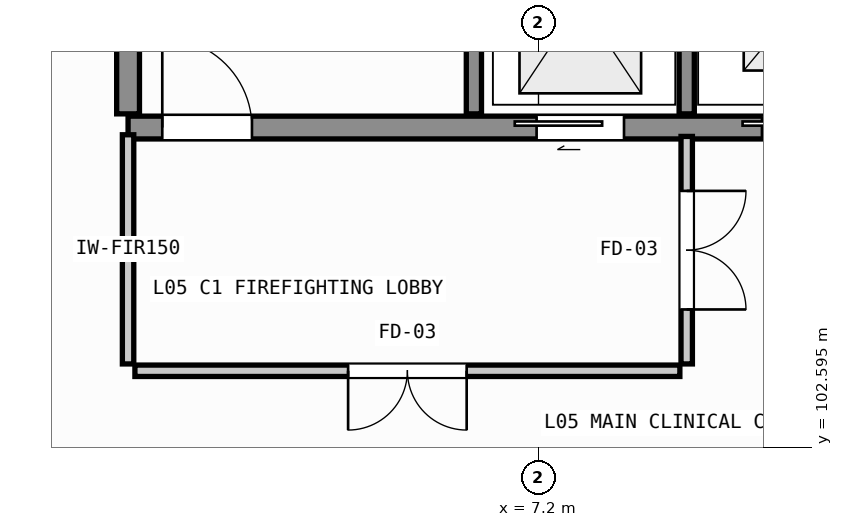
"""IFC4 building model, lengths in metres.
Left out: names, types, materials, properties, quantities, classifications, styles, units other than length and angle.
Written with IfcOpenShell. Run it as: python <this file> out.ifc"""

import sys

from ifc_helpers import new_model, si_unit, direction, frame, frame_2d, origin, place, context, subcontext, project, spatial, rectangle, extrude, element, fill, save


model = new_model("IFC4")
c1 = context("Model", 3, precision=1e-05, world=origin(), true_north=direction((0.0, 1.0)))
c2 = subcontext(c1, "Body", "Model", "MODEL_VIEW")
j1 = project(units=[si_unit("LENGTHUNIT", "METRE"), si_unit("PLANEANGLEUNIT", "RADIAN")], contexts=[c1])
p1 = place(None, origin())
s1 = spatial("IfcSite", under=j1, at=p1, CompositionType="ELEMENT")
p2 = place(p1, origin())
s2 = spatial("IfcBuilding", under=s1, at=p2, CompositionType="ELEMENT")
p3 = place(p2, frame((0.0, 0.0, 17.7)))
s3 = spatial("IfcBuildingStorey", under=s2, at=p3, CompositionType="ELEMENT", Elevation=17.7)
p4 = place(p3, frame((1.8, 106.8, 0.0), z_axis=(0.0, 0.0, 1.0), x_axis=(1.0, 0.0, 0.0)))
e1 = element("IfcWall", 1, at=p4, inside=s3, PredefinedType="SHEAR", context=c2, shape_type="SweptSolid", body=[
    extrude(rectangle(XDim=10.8, YDim=0.3, at=frame_2d((5.4, 0.0))), origin(), (0.0, 0.0, 1.0), 3.9),
])
p5 = place(p4, frame((0.45, 0.0, 0.0)))
e2 = element("IfcOpeningElement", 2, at=p5, cuts=e1, PredefinedType="OPENING", context=c2, shape_type="SweptSolid", body=[
    extrude(rectangle(XDim=1.18, YDim=2.16, at=frame_2d((0.59, 1.08))), frame((0.0, 0.16, 0.0), z_axis=(0.0, -1.0, 0.0), x_axis=(1.0, 0.0, 0.0)), (0.0, 0.0, 1.0), 0.32),
])
p6 = place(p4, frame((5.375, 0.0, 0.0)))
e3 = element("IfcOpeningElement", 3, at=p6, cuts=e1, PredefinedType="OPENING", context=c2, shape_type="SweptSolid", body=[
    extrude(rectangle(XDim=1.15, YDim=2.15, at=frame_2d((0.575, 1.075))), frame((0.0, 0.16, 0.0), z_axis=(0.0, -1.0, 0.0), x_axis=(1.0, 0.0, 0.0)), (0.0, 0.0, 1.0), 0.32),
])
p7 = place(p4, frame((8.34, 0.0, 0.0)))
e4 = element("IfcOpeningElement", 4, at=p7, cuts=e1, PredefinedType="OPENING", context=c2, shape_type="SweptSolid", body=[
    extrude(rectangle(XDim=1.02, YDim=2.12, at=frame_2d((0.51, 1.06))), frame((0.0, 0.16, 0.0), z_axis=(0.0, -1.0, 0.0), x_axis=(1.0, 0.0, 0.0)), (0.0, 0.0, 1.0), 0.32),
])
p8 = place(p3, frame((1.8, 106.98, 0.0), z_axis=(0.0, 0.0, 1.0), x_axis=(0.0, 1.0, 0.0)))
e5 = element("IfcWall", 5, at=p8, inside=s3, PredefinedType="SHEAR", context=c2, shape_type="SweptSolid", body=[
    extrude(rectangle(XDim=6.24, YDim=0.3, at=frame_2d((3.12, 0.0))), origin(), (0.0, 0.0, 1.0), 3.9),
])
for number, where, z_axis, x_axis in (
    (6, (6.35, 106.98, 0.0), (0.0, 0.0, 1.0), (0.0, 1.0, 0.0)),
    (7, (9.15, 106.98, 0.0), (0.0, 0.0, 1.0), (0.0, 1.0, 0.0)),
):
    element("IfcWall", number, at=place(p3, frame(where, z_axis=z_axis, x_axis=x_axis)), inside=s3, PredefinedType="SHEAR", context=c2, shape_type="SweptSolid", body=[
        extrude(rectangle(XDim=3.15, YDim=0.2, at=frame_2d((1.575, 0.0))), origin(), (0.0, 0.0, 1.0), 3.9),
    ])
p9 = place(p3, frame((1.8, 103.69, 0.0), z_axis=(0.0, 0.0, 1.0), x_axis=(0.0, 1.0, 0.0)))
e8 = element("IfcWall", 8, at=p9, inside=s3, PredefinedType="PARTITIONING", context=c2, shape_type="SweptSolid", body=[
    extrude(rectangle(XDim=3.015, YDim=0.15, at=frame_2d((1.508, 0.0))), origin(), (0.0, 0.0, 1.0), 3.67),
])
p10 = place(p3, frame((9.15, 106.683, 0.0), z_axis=(0.0, 0.0, 1.0), x_axis=(0.0, -1.0, 0.0)))
e9 = element("IfcWall", 9, at=p10, inside=s3, PredefinedType="PARTITIONING", context=c2, shape_type="SweptSolid", body=[
    extrude(rectangle(XDim=2.993, YDim=0.15, at=frame_2d((1.497, 0.0))), origin(), (0.0, 0.0, 1.0), 3.67),
])
p11 = place(p10, frame((0.717, 0.0, 0.0)))
e10 = element("IfcOpeningElement", 10, at=p11, cuts=e9, PredefinedType="OPENING", context=c2, shape_type="SweptSolid", body=[
    extrude(rectangle(XDim=1.56, YDim=2.22, at=frame_2d((0.78, 1.11))), frame((0.0, 0.085, 0.0), z_axis=(0.0, -1.0, 0.0), x_axis=(1.0, 0.0, 0.0)), (0.0, 0.0, 1.0), 0.17),
])
p12 = place(p3, frame((9.06, 103.6, 0.0), z_axis=(0.0, 0.0, 1.0), x_axis=(-1.0, 0.0, 0.0)))
e11 = element("IfcWall", 11, at=p12, inside=s3, PredefinedType="PARTITIONING", context=c2, shape_type="SweptSolid", body=[
    extrude(rectangle(XDim=7.17, YDim=0.15, at=frame_2d((3.585, 0.0))), origin(), (0.0, 0.0, 1.0), 3.67),
])
p13 = place(p12, frame((2.805, 0.0, 0.0)))
e12 = element("IfcOpeningElement", 12, at=p13, cuts=e11, PredefinedType="OPENING", context=c2, shape_type="SweptSolid", body=[
    extrude(rectangle(XDim=1.56, YDim=2.22, at=frame_2d((0.78, 1.11))), frame((0.0, 0.085, 0.0), z_axis=(0.0, -1.0, 0.0), x_axis=(1.0, 0.0, 0.0)), (0.0, 0.0, 1.0), 0.17),
])
p14 = place(p5, origin())
e13 = element("IfcDoor", 13, at=p14, inside=s3, OperationType="SINGLE_SWING_LEFT", PredefinedType="DOOR", context=c2, shape_type="SweptSolid", body=[
    extrude(rectangle(XDim=1.18, YDim=2.16, at=frame_2d((0.59, 1.08))), frame((0.0, 0.025, 0.0), z_axis=(0.0, -1.0, 0.0), x_axis=(1.0, 0.0, 0.0)), (0.0, 0.0, 1.0), 0.05),
])
fill(e2, e13)
p15 = place(p6, origin())
e14 = element("IfcDoor", 14, at=p15, inside=s3, OperationType="DOUBLE_DOOR_SLIDING", PredefinedType="DOOR", context=c2, shape_type="SweptSolid", body=[
    extrude(rectangle(XDim=1.15, YDim=2.15, at=frame_2d((0.575, 1.075))), frame((0.0, 0.025, 0.0), z_axis=(0.0, -1.0, 0.0), x_axis=(1.0, 0.0, 0.0)), (0.0, 0.0, 1.0), 0.05),
])
fill(e3, e14)
p16 = place(p7, origin())
e15 = element("IfcDoor", 15, at=p16, inside=s3, OperationType="SLIDING_TO_LEFT", PredefinedType="DOOR", context=c2, shape_type="SweptSolid", body=[
    extrude(rectangle(XDim=1.02, YDim=2.12, at=frame_2d((0.51, 1.06))), frame((0.0, 0.025, 0.0), z_axis=(0.0, -1.0, 0.0), x_axis=(1.0, 0.0, 0.0)), (0.0, 0.0, 1.0), 0.05),
])
fill(e4, e15)
p17 = place(p11, origin())
e16 = element("IfcDoor", 16, at=p17, inside=s3, OperationType="DOUBLE_DOOR_SINGLE_SWING", PredefinedType="DOOR", context=c2, shape_type="SweptSolid", body=[
    extrude(rectangle(XDim=1.56, YDim=2.22, at=frame_2d((0.78, 1.11))), frame((0.0, 0.025, 0.0), z_axis=(0.0, -1.0, 0.0), x_axis=(1.0, 0.0, 0.0)), (0.0, 0.0, 1.0), 0.05),
])
fill(e10, e16)
p18 = place(p13, origin())
e17 = element("IfcDoor", 17, at=p18, inside=s3, OperationType="DOUBLE_DOOR_SINGLE_SWING", PredefinedType="DOOR", context=c2, shape_type="SweptSolid", body=[
    extrude(rectangle(XDim=1.56, YDim=2.22, at=frame_2d((0.78, 1.11))), frame((0.0, 0.025, 0.0), z_axis=(0.0, -1.0, 0.0), x_axis=(1.0, 0.0, 0.0)), (0.0, 0.0, 1.0), 0.05),
])
fill(e12, e17)
save(model, sys.argv[1])
